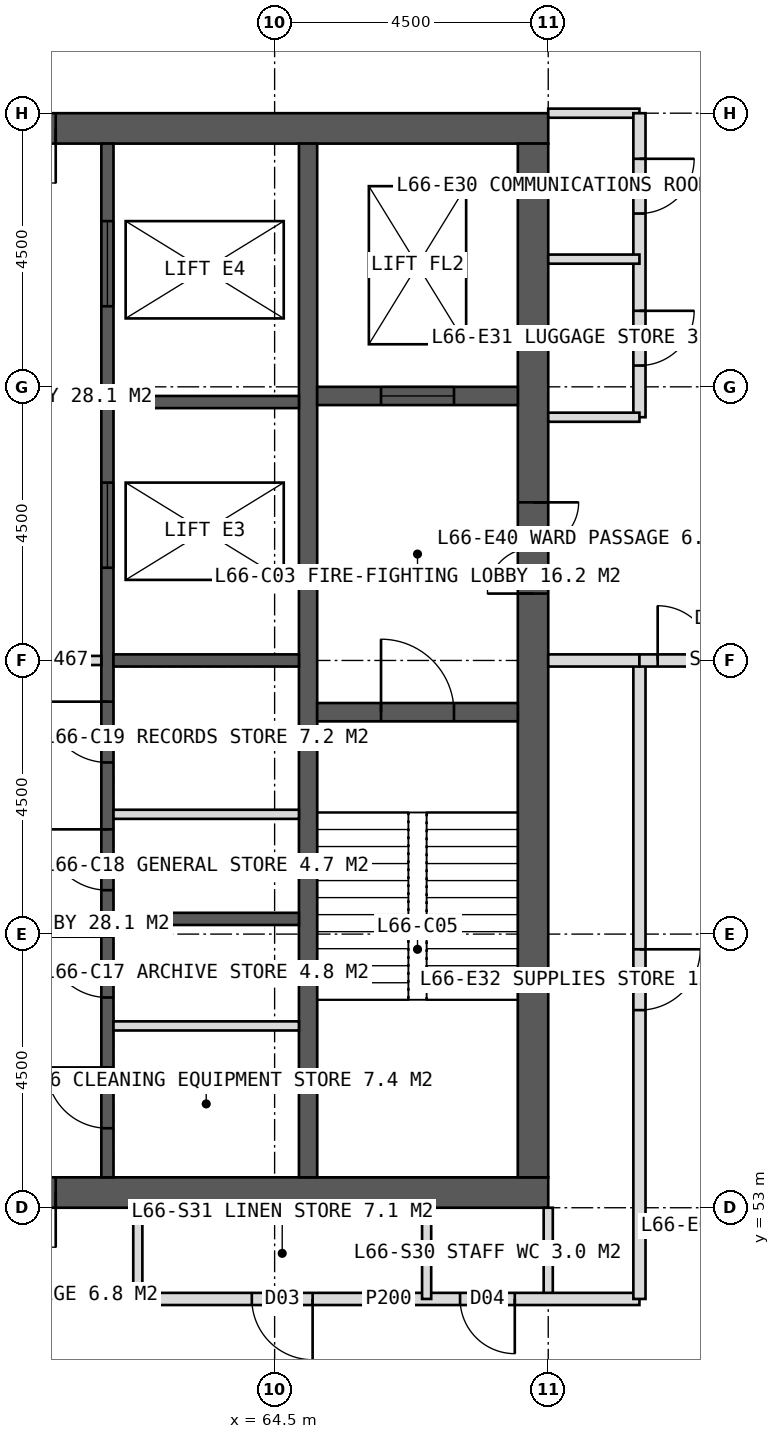
"""IFC4 building model, lengths in metres.
Left out: names, types, materials, properties, quantities, classifications, styles, units other than length and angle.
Written with IfcOpenShell. Run it as: python <this file> out.ifc"""

import sys

from ifc_helpers import new_model, si_unit, direction, frame, frame_2d, origin, place, context, subcontext, project, spatial, rectangle, extrude, element, fill, save


model = new_model("IFC4")
c1 = context("Model", 3, precision=1e-05, world=origin(), true_north=direction((0.0, 1.0)))
c2 = subcontext(c1, "Body", "Model", "MODEL_VIEW")
j1 = project(units=[si_unit("LENGTHUNIT", "METRE"), si_unit("PLANEANGLEUNIT", "RADIAN")], contexts=[c1])
p1 = place(None, origin())
s1 = spatial("IfcSite", under=j1, at=p1, CompositionType="ELEMENT")
p2 = place(p1, origin())
s2 = spatial("IfcBuilding", under=s1, at=p2, CompositionType="ELEMENT")
p3 = place(p2, frame((0.0, 0.0, 274.0)))
s3 = spatial("IfcBuildingStorey", under=s2, at=p3, CompositionType="ELEMENT", Elevation=274.0)
p4 = place(p3, frame((51.0, 70.75, 0.0), z_axis=(0.0, 0.0, 1.0), x_axis=(1.0, 0.0, 0.0)))
e1 = element("IfcWall", 1, at=p4, inside=s3, PredefinedType="SHEAR", context=c2, shape_type="SweptSolid", body=[
    extrude(rectangle(XDim=18.0, YDim=0.5, at=frame_2d((9.0, 0.0))), origin(), (0.0, 0.0, 1.0), 4.0),
])
p5 = place(p4, frame((8.1, 0.0, 0.0)))
e2 = element("IfcOpeningElement", 2, at=p5, cuts=e1, PredefinedType="OPENING", context=c2, shape_type="SweptSolid", body=[
    extrude(rectangle(XDim=1.8, YDim=2.2, at=frame_2d((0.9, 1.1))), frame((0.0, 0.26, 0.0), z_axis=(0.0, -1.0, 0.0), x_axis=(1.0, 0.0, 0.0)), (0.0, 0.0, 1.0), 0.52),
])
p6 = place(p3, frame((51.0, 53.25, 0.0), z_axis=(0.0, 0.0, 1.0), x_axis=(1.0, 0.0, 0.0)))
e3 = element("IfcWall", 3, at=p6, inside=s3, PredefinedType="SHEAR", context=c2, shape_type="SweptSolid", body=[
    extrude(rectangle(XDim=18.0, YDim=0.5, at=frame_2d((9.0, 0.0))), origin(), (0.0, 0.0, 1.0), 4.0),
])
p7 = place(p6, frame((8.1, 0.0, 0.0)))
e4 = element("IfcOpeningElement", 4, at=p7, cuts=e3, PredefinedType="OPENING", context=c2, shape_type="SweptSolid", body=[
    extrude(rectangle(XDim=1.8, YDim=2.2, at=frame_2d((0.9, 1.1))), frame((0.0, 0.26, 0.0), z_axis=(0.0, -1.0, 0.0), x_axis=(1.0, 0.0, 0.0)), (0.0, 0.0, 1.0), 0.52),
])
p8 = place(p3, frame((68.75, 53.5, 0.0), z_axis=(0.0, 0.0, 1.0), x_axis=(0.0, 1.0, 0.0)))
e5 = element("IfcWall", 5, at=p8, inside=s3, PredefinedType="SHEAR", context=c2, shape_type="SweptSolid", body=[
    extrude(rectangle(XDim=17.0, YDim=0.5, at=frame_2d((8.5, 0.0))), origin(), (0.0, 0.0, 1.0), 4.0),
])
p9 = place(p8, frame((9.6, 0.0, 0.0)))
e6 = element("IfcOpeningElement", 6, at=p9, cuts=e5, PredefinedType="OPENING", context=c2, shape_type="SweptSolid", body=[
    extrude(rectangle(XDim=1.5, YDim=2.2, at=frame_2d((0.75, 1.1))), frame((0.0, 0.26, 0.0), z_axis=(0.0, -1.0, 0.0), x_axis=(1.0, 0.0, 0.0)), (0.0, 0.0, 1.0), 0.52),
])
p10 = place(p3, frame((65.05, 53.5, 0.0), z_axis=(0.0, 0.0, 1.0), x_axis=(0.0, 1.0, 0.0)))
e7 = element("IfcWall", 7, at=p10, inside=s3, PredefinedType="SHEAR", context=c2, shape_type="SweptSolid", body=[
    extrude(rectangle(XDim=17.0, YDim=0.3, at=frame_2d((8.5, 0.0))), origin(), (0.0, 0.0, 1.0), 4.0),
])
p11 = place(p3, frame((61.75, 53.5, 0.0), z_axis=(0.0, 0.0, 1.0), x_axis=(0.0, 1.0, 0.0)))
e8 = element("IfcWall", 8, at=p11, inside=s3, PredefinedType="SHEAR", context=c2, shape_type="SweptSolid", body=[
    extrude(rectangle(XDim=17.0, YDim=0.2, at=frame_2d((8.5, 0.0))), origin(), (0.0, 0.0, 1.0), 4.0),
])
p12 = place(p11, frame((0.808, 0.0, 0.0)))
e9 = element("IfcOpeningElement", 9, at=p12, cuts=e8, PredefinedType="OPENING", context=c2, shape_type="SweptSolid", body=[
    extrude(rectangle(XDim=1.0, YDim=2.1, at=frame_2d((0.5, 1.05))), frame((0.0, 0.11, 0.0), z_axis=(0.0, -1.0, 0.0), x_axis=(1.0, 0.0, 0.0)), (0.0, 0.0, 1.0), 0.22),
])
p13 = place(p11, frame((2.958, 0.0, 0.0)))
e10 = element("IfcOpeningElement", 10, at=p13, cuts=e8, PredefinedType="OPENING", context=c2, shape_type="SweptSolid", body=[
    extrude(rectangle(XDim=1.0, YDim=2.1, at=frame_2d((0.5, 1.05))), frame((0.0, 0.11, 0.0), z_axis=(0.0, -1.0, 0.0), x_axis=(1.0, 0.0, 0.0)), (0.0, 0.0, 1.0), 0.22),
])
p14 = place(p11, frame((4.722, 0.0, 0.0)))
e11 = element("IfcOpeningElement", 11, at=p14, cuts=e8, PredefinedType="OPENING", context=c2, shape_type="SweptSolid", body=[
    extrude(rectangle(XDim=1.0, YDim=2.1, at=frame_2d((0.5, 1.05))), frame((0.0, 0.11, 0.0), z_axis=(0.0, -1.0, 0.0), x_axis=(1.0, 0.0, 0.0)), (0.0, 0.0, 1.0), 0.22),
])
p15 = place(p11, frame((6.823, 0.0, 0.0)))
e12 = element("IfcOpeningElement", 12, at=p15, cuts=e8, PredefinedType="OPENING", context=c2, shape_type="SweptSolid", body=[
    extrude(rectangle(XDim=1.0, YDim=2.1, at=frame_2d((0.5, 1.05))), frame((0.0, 0.11, 0.0), z_axis=(0.0, -1.0, 0.0), x_axis=(1.0, 0.0, 0.0)), (0.0, 0.0, 1.0), 0.22),
])
p16 = place(p11, frame((10.025, 0.0, 0.0)))
e13 = element("IfcOpeningElement", 13, at=p16, cuts=e8, PredefinedType="OPENING", context=c2, shape_type="SweptSolid", body=[
    extrude(rectangle(XDim=1.4, YDim=2.2, at=frame_2d((0.7, 1.1))), frame((0.0, 0.11, 0.0), z_axis=(0.0, -1.0, 0.0), x_axis=(1.0, 0.0, 0.0)), (0.0, 0.0, 1.0), 0.22),
])
p17 = place(p11, frame((14.325, 0.0, 0.0)))
e14 = element("IfcOpeningElement", 14, at=p17, cuts=e8, PredefinedType="OPENING", context=c2, shape_type="SweptSolid", body=[
    extrude(rectangle(XDim=1.4, YDim=2.2, at=frame_2d((0.7, 1.1))), frame((0.0, 0.11, 0.0), z_axis=(0.0, -1.0, 0.0), x_axis=(1.0, 0.0, 0.0)), (0.0, 0.0, 1.0), 0.22),
])
for number, where, z_axis, x_axis in (
    (15, (61.85, 57.75, 0.0), (0.0, 0.0, 1.0), (1.0, 0.0, 0.0)),
    (16, (61.85, 62.0, 0.0), (0.0, 0.0, 1.0), (1.0, 0.0, 0.0)),
    (17, (61.85, 66.25, 0.0), (0.0, 0.0, 1.0), (1.0, 0.0, 0.0)),
):
    element("IfcWall", number, at=place(p3, frame(where, z_axis=z_axis, x_axis=x_axis)), inside=s3, PredefinedType="SHEAR", context=c2, shape_type="SweptSolid", body=[
        extrude(rectangle(XDim=3.05, YDim=0.2, at=frame_2d((1.525, 0.0))), origin(), (0.0, 0.0, 1.0), 4.0),
    ])
p18 = place(p3, frame((65.2, 61.15, 0.0), z_axis=(0.0, 0.0, 1.0), x_axis=(1.0, 0.0, 0.0)))
e18 = element("IfcWall", 18, at=p18, inside=s3, PredefinedType="SHEAR", context=c2, shape_type="SweptSolid", body=[
    extrude(rectangle(XDim=3.3, YDim=0.3, at=frame_2d((1.65, 0.0))), origin(), (0.0, 0.0, 1.0), 4.0),
])
p19 = place(p18, frame((1.05, 0.0, 0.0)))
e19 = element("IfcOpeningElement", 19, at=p19, cuts=e18, PredefinedType="OPENING", context=c2, shape_type="SweptSolid", body=[
    extrude(rectangle(XDim=1.2, YDim=2.1, at=frame_2d((0.6, 1.05))), frame((0.0, 0.16, 0.0), z_axis=(0.0, -1.0, 0.0), x_axis=(1.0, 0.0, 0.0)), (0.0, 0.0, 1.0), 0.32),
])
p20 = place(p3, frame((65.2, 66.35, 0.0), z_axis=(0.0, 0.0, 1.0), x_axis=(1.0, 0.0, 0.0)))
e20 = element("IfcWall", 20, at=p20, inside=s3, PredefinedType="SHEAR", context=c2, shape_type="SweptSolid", body=[
    extrude(rectangle(XDim=3.3, YDim=0.3, at=frame_2d((1.65, 0.0))), origin(), (0.0, 0.0, 1.0), 4.0),
])
p21 = place(p20, frame((1.05, 0.0, 0.0)))
e21 = element("IfcOpeningElement", 21, at=p21, cuts=e20, PredefinedType="OPENING", context=c2, shape_type="SweptSolid", body=[
    extrude(rectangle(XDim=1.2, YDim=2.2, at=frame_2d((0.6, 1.1))), frame((0.0, 0.16, 0.0), z_axis=(0.0, -1.0, 0.0), x_axis=(1.0, 0.0, 0.0)), (0.0, 0.0, 1.0), 0.32),
])
p22 = place(p3, frame((69.0, 53.0, 0.0), z_axis=(0.0, 0.0, 1.0), x_axis=(0.0, -1.0, 0.0)))
e22 = element("IfcWall", 22, at=p22, inside=s3, PredefinedType="PARTITIONING", context=c2, shape_type="SweptSolid", body=[
    extrude(rectangle(XDim=1.5, YDim=0.15, at=frame_2d((0.75, 0.0))), origin(), (0.0, 0.0, 1.0), 3.75),
])
p23 = place(p3, frame((70.5, 51.5, 0.0), z_axis=(0.0, 0.0, 1.0), x_axis=(-1.0, 0.0, 0.0)))
e23 = element("IfcWall", 23, at=p23, inside=s3, PredefinedType="PARTITIONING", context=c2, shape_type="SweptSolid", body=[
    extrude(rectangle(XDim=8.25, YDim=0.2, at=frame_2d((4.125, 0.0))), origin(), (0.0, 0.0, 1.0), 3.75),
])
p24 = place(p23, frame((2.05, 0.0, 0.0)))
e24 = element("IfcOpeningElement", 24, at=p24, cuts=e23, PredefinedType="OPENING", context=c2, shape_type="SweptSolid", body=[
    extrude(rectangle(XDim=0.9, YDim=2.1, at=frame_2d((0.45, 1.05))), frame((0.0, 0.11, 0.0), z_axis=(0.0, -1.0, 0.0), x_axis=(1.0, 0.0, 0.0)), (0.0, 0.0, 1.0), 0.22),
])
p25 = place(p23, frame((5.375, 0.0, 0.0)))
e25 = element("IfcOpeningElement", 25, at=p25, cuts=e23, PredefinedType="OPENING", context=c2, shape_type="SweptSolid", body=[
    extrude(rectangle(XDim=1.0, YDim=2.1, at=frame_2d((0.5, 1.05))), frame((0.0, 0.11, 0.0), z_axis=(0.0, -1.0, 0.0), x_axis=(1.0, 0.0, 0.0)), (0.0, 0.0, 1.0), 0.22),
])
for number, where, z_axis, x_axis in (
    (26, (62.25, 53.0, 0.0), (0.0, 0.0, 1.0), (0.0, -1.0, 0.0)),
    (27, (67.0, 53.0, 0.0), (0.0, 0.0, 1.0), (0.0, -1.0, 0.0)),
    (28, (69.0, 71.0, 0.0), (0.0, 0.0, 1.0), (1.0, 0.0, 0.0)),
):
    element("IfcWall", number, at=place(p3, frame(where, z_axis=z_axis, x_axis=x_axis)), inside=s3, PredefinedType="PARTITIONING", context=c2, shape_type="SweptSolid", body=[
        extrude(rectangle(XDim=1.5, YDim=0.15, at=frame_2d((0.75, 0.0))), origin(), (0.0, 0.0, 1.0), 3.75),
    ])
p26 = place(p3, frame((70.5, 71.0, 0.0), z_axis=(0.0, 0.0, 1.0), x_axis=(0.0, -1.0, 0.0)))
e29 = element("IfcWall", 29, at=p26, inside=s3, PredefinedType="PARTITIONING", context=c2, shape_type="SweptSolid", body=[
    extrude(rectangle(XDim=5.0, YDim=0.2, at=frame_2d((2.5, 0.0))), origin(), (0.0, 0.0, 1.0), 3.75),
])
p27 = place(p26, frame((0.75, 0.0, 0.0)))
e30 = element("IfcOpeningElement", 30, at=p27, cuts=e29, PredefinedType="OPENING", context=c2, shape_type="SweptSolid", body=[
    extrude(rectangle(XDim=0.9, YDim=2.1, at=frame_2d((0.45, 1.05))), frame((0.0, 0.11, 0.0), z_axis=(0.0, -1.0, 0.0), x_axis=(1.0, 0.0, 0.0)), (0.0, 0.0, 1.0), 0.22),
])
p28 = place(p26, frame((3.25, 0.0, 0.0)))
e31 = element("IfcOpeningElement", 31, at=p28, cuts=e29, PredefinedType="OPENING", context=c2, shape_type="SweptSolid", body=[
    extrude(rectangle(XDim=0.9, YDim=2.1, at=frame_2d((0.45, 1.05))), frame((0.0, 0.11, 0.0), z_axis=(0.0, -1.0, 0.0), x_axis=(1.0, 0.0, 0.0)), (0.0, 0.0, 1.0), 0.22),
])
p29 = place(p3, frame((70.5, 62.0, 0.0), z_axis=(0.0, 0.0, 1.0), x_axis=(0.0, -1.0, 0.0)))
e32 = element("IfcWall", 32, at=p29, inside=s3, PredefinedType="PARTITIONING", context=c2, shape_type="SweptSolid", body=[
    extrude(rectangle(XDim=10.5, YDim=0.2, at=frame_2d((5.25, 0.0))), origin(), (0.0, 0.0, 1.0), 3.75),
])
p30 = place(p29, frame((4.75, 0.0, 0.0)))
e33 = element("IfcOpeningElement", 33, at=p30, cuts=e32, PredefinedType="OPENING", context=c2, shape_type="SweptSolid", body=[
    extrude(rectangle(XDim=1.0, YDim=2.1, at=frame_2d((0.5, 1.05))), frame((0.0, 0.11, 0.0), z_axis=(0.0, -1.0, 0.0), x_axis=(1.0, 0.0, 0.0)), (0.0, 0.0, 1.0), 0.22),
])
p31 = place(p3, frame((69.0, 66.0, 0.0), z_axis=(0.0, 0.0, 1.0), x_axis=(1.0, 0.0, 0.0)))
e34 = element("IfcWall", 34, at=p31, inside=s3, PredefinedType="PARTITIONING", context=c2, shape_type="SweptSolid", body=[
    extrude(rectangle(XDim=1.5, YDim=0.15, at=frame_2d((0.75, 0.0))), origin(), (0.0, 0.0, 1.0), 3.75),
])
p32 = place(p3, frame((69.0, 62.0, 0.0), z_axis=(0.0, 0.0, 1.0), x_axis=(1.0, 0.0, 0.0)))
e35 = element("IfcWall", 35, at=p32, inside=s3, PredefinedType="SOLIDWALL", context=c2, shape_type="SweptSolid", body=[
    extrude(rectangle(XDim=1.5, YDim=0.2, at=frame_2d((0.75, 0.0))), origin(), (0.0, 0.0, 1.0), 2.75),
])
p33 = place(p3, frame((69.0, 68.6, 0.0), z_axis=(0.0, 0.0, 1.0), x_axis=(1.0, 0.0, 0.0)))
e36 = element("IfcWall", 36, at=p33, inside=s3, PredefinedType="PARTITIONING", context=c2, shape_type="SweptSolid", body=[
    extrude(rectangle(XDim=1.5, YDim=0.15, at=frame_2d((0.75, 0.0))), origin(), (0.0, 0.0, 1.0), 3.75),
])
p34 = place(p3, frame((70.5, 62.0, 0.0), z_axis=(0.0, 0.0, 1.0), x_axis=(1.0, 0.0, 0.0)))
e37 = element("IfcWall", 37, at=p34, inside=s3, PredefinedType="SOLIDWALL", context=c2, shape_type="SweptSolid", body=[
    extrude(rectangle(XDim=2.6, YDim=0.2, at=frame_2d((1.3, 0.0))), origin(), (0.0, 0.0, 1.0), 2.75),
])
p35 = place(p34, frame((0.3, 0.0, 0.0)))
e38 = element("IfcOpeningElement", 38, at=p35, cuts=e37, PredefinedType="OPENING", context=c2, shape_type="SweptSolid", body=[
    extrude(rectangle(XDim=1.8, YDim=2.2, at=frame_2d((0.9, 1.1))), frame((0.0, 0.11, 0.0), z_axis=(0.0, -1.0, 0.0), x_axis=(1.0, 0.0, 0.0)), (0.0, 0.0, 1.0), 0.22),
])
for number, where, z_axis, x_axis in (
    (39, (61.85, 55.99, 0.0), (0.0, 0.0, 1.0), (1.0, 0.0, 0.0)),
    (40, (61.85, 59.47, 0.0), (0.0, 0.0, 1.0), (1.0, 0.0, 0.0)),
):
    element("IfcWall", number, at=place(p3, frame(where, z_axis=z_axis, x_axis=x_axis)), inside=s3, PredefinedType="PARTITIONING", context=c2, shape_type="SweptSolid", body=[
        extrude(rectangle(XDim=3.05, YDim=0.15, at=frame_2d((1.525, 0.0))), origin(), (0.0, 0.0, 1.0), 3.75),
    ])
p36 = place(p3, frame((58.35, 62.0, 0.0), z_axis=(0.0, 0.0, 1.0), x_axis=(1.0, 0.0, 0.0)))
e41 = element("IfcWall", 41, at=p36, inside=s3, PredefinedType="PARTITIONING", context=c2, shape_type="SweptSolid", body=[
    extrude(rectangle(XDim=3.3, YDim=0.15, at=frame_2d((1.65, 0.0))), origin(), (0.0, 0.0, 1.0), 3.75),
])
p37 = place(p24, origin())
e42 = element("IfcDoor", 42, at=p37, inside=s3, OperationType="SINGLE_SWING_LEFT", PredefinedType="DOOR", context=c2, shape_type="SweptSolid", body=[
    extrude(rectangle(XDim=0.9, YDim=2.1, at=frame_2d((0.45, 1.05))), frame((0.0, 0.025, 0.0), z_axis=(0.0, -1.0, 0.0), x_axis=(1.0, 0.0, 0.0)), (0.0, 0.0, 1.0), 0.05),
])
fill(e24, e42)
p38 = place(p25, origin())
e43 = element("IfcDoor", 43, at=p38, inside=s3, OperationType="SINGLE_SWING_LEFT", PredefinedType="DOOR", context=c2, shape_type="SweptSolid", body=[
    extrude(rectangle(XDim=1.0, YDim=2.1, at=frame_2d((0.5, 1.05))), frame((0.0, 0.025, 0.0), z_axis=(0.0, -1.0, 0.0), x_axis=(1.0, 0.0, 0.0)), (0.0, 0.0, 1.0), 0.05),
])
fill(e25, e43)
p39 = place(p27, origin())
e44 = element("IfcDoor", 44, at=p39, inside=s3, OperationType="SINGLE_SWING_LEFT", PredefinedType="DOOR", context=c2, shape_type="SweptSolid", body=[
    extrude(rectangle(XDim=0.9, YDim=2.1, at=frame_2d((0.45, 1.05))), frame((0.0, 0.025, 0.0), z_axis=(0.0, -1.0, 0.0), x_axis=(1.0, 0.0, 0.0)), (0.0, 0.0, 1.0), 0.05),
])
fill(e30, e44)
p40 = place(p28, origin())
e45 = element("IfcDoor", 45, at=p40, inside=s3, OperationType="SINGLE_SWING_LEFT", PredefinedType="DOOR", context=c2, shape_type="SweptSolid", body=[
    extrude(rectangle(XDim=0.9, YDim=2.1, at=frame_2d((0.45, 1.05))), frame((0.0, 0.025, 0.0), z_axis=(0.0, -1.0, 0.0), x_axis=(1.0, 0.0, 0.0)), (0.0, 0.0, 1.0), 0.05),
])
fill(e31, e45)
p41 = place(p30, origin())
e46 = element("IfcDoor", 46, at=p41, inside=s3, OperationType="SINGLE_SWING_LEFT", PredefinedType="DOOR", context=c2, shape_type="SweptSolid", body=[
    extrude(rectangle(XDim=1.0, YDim=2.1, at=frame_2d((0.5, 1.05))), frame((0.0, 0.025, 0.0), z_axis=(0.0, -1.0, 0.0), x_axis=(1.0, 0.0, 0.0)), (0.0, 0.0, 1.0), 0.05),
])
fill(e33, e46)
p42 = place(p35, origin())
e47 = element("IfcDoor", 47, at=p42, inside=s3, OperationType="DOUBLE_DOOR_DOUBLE_SWING", PredefinedType="DOOR", context=c2, shape_type="SweptSolid", body=[
    extrude(rectangle(XDim=1.8, YDim=2.2, at=frame_2d((0.9, 1.1))), frame((0.0, 0.025, 0.0), z_axis=(0.0, -1.0, 0.0), x_axis=(1.0, 0.0, 0.0)), (0.0, 0.0, 1.0), 0.05),
])
fill(e38, e47)
p43 = place(p5, origin())
e48 = element("IfcDoor", 48, at=p43, inside=s3, OperationType="DOUBLE_DOOR_SINGLE_SWING", PredefinedType="DOOR", context=c2, shape_type="SweptSolid", body=[
    extrude(rectangle(XDim=1.8, YDim=2.2, at=frame_2d((0.9, 1.1))), frame((0.0, 0.025, 0.0), z_axis=(0.0, -1.0, 0.0), x_axis=(1.0, 0.0, 0.0)), (0.0, 0.0, 1.0), 0.05),
])
fill(e2, e48)
p44 = place(p9, origin())
e49 = element("IfcDoor", 49, at=p44, inside=s3, OperationType="DOUBLE_DOOR_SINGLE_SWING", PredefinedType="DOOR", context=c2, shape_type="SweptSolid", body=[
    extrude(rectangle(XDim=1.5, YDim=2.2, at=frame_2d((0.75, 1.1))), frame((0.0, 0.025, 0.0), z_axis=(0.0, -1.0, 0.0), x_axis=(1.0, 0.0, 0.0)), (0.0, 0.0, 1.0), 0.05),
])
fill(e6, e49)
p45 = place(p19, origin())
e50 = element("IfcDoor", 50, at=p45, inside=s3, OperationType="SINGLE_SWING_LEFT", PredefinedType="DOOR", context=c2, shape_type="SweptSolid", body=[
    extrude(rectangle(XDim=1.2, YDim=2.1, at=frame_2d((0.6, 1.05))), frame((0.0, 0.025, 0.0), z_axis=(0.0, -1.0, 0.0), x_axis=(1.0, 0.0, 0.0)), (0.0, 0.0, 1.0), 0.05),
])
fill(e19, e50)
p46 = place(p21, origin())
e51 = element("IfcDoor", 51, at=p46, inside=s3, OperationType="SLIDING_TO_LEFT", PredefinedType="DOOR", context=c2, shape_type="SweptSolid", body=[
    extrude(rectangle(XDim=1.2, YDim=2.2, at=frame_2d((0.6, 1.1))), frame((0.0, 0.025, 0.0), z_axis=(0.0, -1.0, 0.0), x_axis=(1.0, 0.0, 0.0)), (0.0, 0.0, 1.0), 0.05),
])
fill(e21, e51)
p47 = place(p12, origin())
e52 = element("IfcDoor", 52, at=p47, inside=s3, OperationType="SINGLE_SWING_RIGHT", PredefinedType="DOOR", context=c2, shape_type="SweptSolid", body=[
    extrude(rectangle(XDim=1.0, YDim=2.1, at=frame_2d((0.5, 1.05))), frame((0.0, 0.025, 0.0), z_axis=(0.0, -1.0, 0.0), x_axis=(1.0, 0.0, 0.0)), (0.0, 0.0, 1.0), 0.05),
])
fill(e9, e52)
p48 = place(p13, origin())
e53 = element("IfcDoor", 53, at=p48, inside=s3, OperationType="SINGLE_SWING_RIGHT", PredefinedType="DOOR", context=c2, shape_type="SweptSolid", body=[
    extrude(rectangle(XDim=1.0, YDim=2.1, at=frame_2d((0.5, 1.05))), frame((0.0, 0.025, 0.0), z_axis=(0.0, -1.0, 0.0), x_axis=(1.0, 0.0, 0.0)), (0.0, 0.0, 1.0), 0.05),
])
fill(e10, e53)
p49 = place(p14, origin())
e54 = element("IfcDoor", 54, at=p49, inside=s3, OperationType="SINGLE_SWING_RIGHT", PredefinedType="DOOR", context=c2, shape_type="SweptSolid", body=[
    extrude(rectangle(XDim=1.0, YDim=2.1, at=frame_2d((0.5, 1.05))), frame((0.0, 0.025, 0.0), z_axis=(0.0, -1.0, 0.0), x_axis=(1.0, 0.0, 0.0)), (0.0, 0.0, 1.0), 0.05),
])
fill(e11, e54)
p50 = place(p15, origin())
e55 = element("IfcDoor", 55, at=p50, inside=s3, OperationType="SINGLE_SWING_RIGHT", PredefinedType="DOOR", context=c2, shape_type="SweptSolid", body=[
    extrude(rectangle(XDim=1.0, YDim=2.1, at=frame_2d((0.5, 1.05))), frame((0.0, 0.025, 0.0), z_axis=(0.0, -1.0, 0.0), x_axis=(1.0, 0.0, 0.0)), (0.0, 0.0, 1.0), 0.05),
])
fill(e12, e55)
p51 = place(p16, origin())
e56 = element("IfcDoor", 56, at=p51, inside=s3, OperationType="SLIDING_TO_LEFT", PredefinedType="DOOR", context=c2, shape_type="SweptSolid", body=[
    extrude(rectangle(XDim=1.4, YDim=2.2, at=frame_2d((0.7, 1.1))), frame((0.0, 0.025, 0.0), z_axis=(0.0, -1.0, 0.0), x_axis=(1.0, 0.0, 0.0)), (0.0, 0.0, 1.0), 0.05),
])
fill(e13, e56)
p52 = place(p17, origin())
e57 = element("IfcDoor", 57, at=p52, inside=s3, OperationType="SLIDING_TO_LEFT", PredefinedType="DOOR", context=c2, shape_type="SweptSolid", body=[
    extrude(rectangle(XDim=1.4, YDim=2.2, at=frame_2d((0.7, 1.1))), frame((0.0, 0.025, 0.0), z_axis=(0.0, -1.0, 0.0), x_axis=(1.0, 0.0, 0.0)), (0.0, 0.0, 1.0), 0.05),
])
fill(e14, e57)
p53 = place(p7, origin())
e58 = element("IfcDoor", 58, at=p53, inside=s3, OperationType="DOUBLE_DOOR_SINGLE_SWING", PredefinedType="DOOR", context=c2, shape_type="SweptSolid", body=[
    extrude(rectangle(XDim=1.8, YDim=2.2, at=frame_2d((0.9, 1.1))), frame((0.0, 0.025, 0.0), z_axis=(0.0, -1.0, 0.0), x_axis=(1.0, 0.0, 0.0)), (0.0, 0.0, 1.0), 0.05),
])
fill(e4, e58)
save(model, sys.argv[1])
